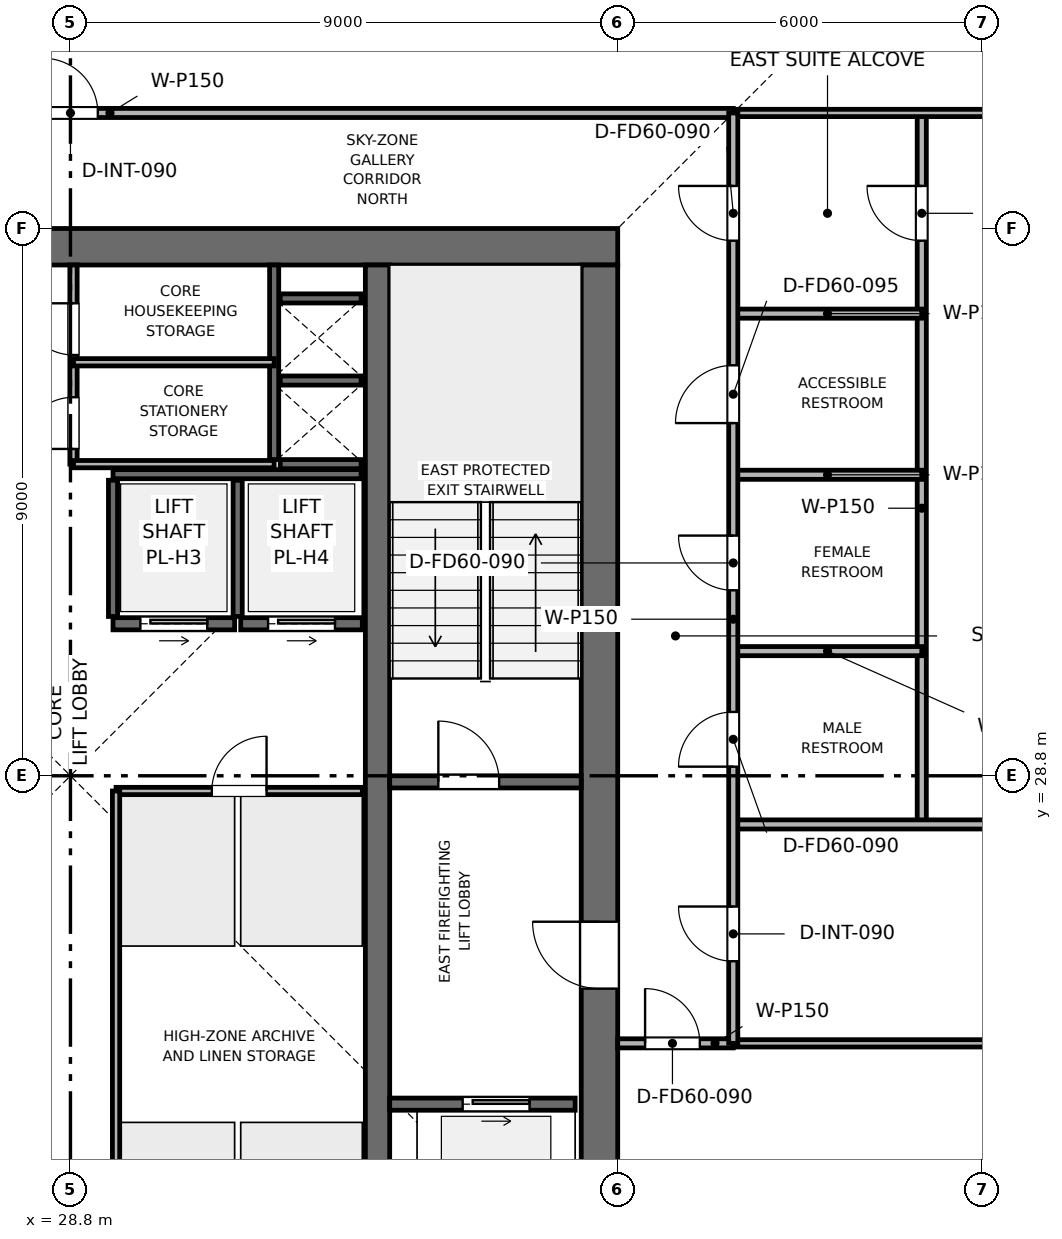
"""IFC4 building model, lengths in metres.
Left out: names, types, materials, properties, quantities, classifications, styles, units other than length and angle.
Written with IfcOpenShell. Run it as: python <this file> out.ifc"""

import sys

from ifc_helpers import new_model, si_unit, direction, frame, frame_2d, origin, place, context, subcontext, project, spatial, rectangle, extrude, element, fill, save


model = new_model("IFC4")
c1 = context("Model", 3, precision=1e-05, world=origin(), true_north=direction((0.0, 1.0)))
c2 = subcontext(c1, "Body", "Model", "MODEL_VIEW")
j1 = project(units=[si_unit("LENGTHUNIT", "METRE"), si_unit("PLANEANGLEUNIT", "RADIAN")], contexts=[c1])
p1 = place(None, origin())
s1 = spatial("IfcSite", under=j1, at=p1, CompositionType="ELEMENT")
p2 = place(p1, origin())
s2 = spatial("IfcBuilding", under=s1, at=p2, CompositionType="ELEMENT")
p3 = place(p2, frame((0.0, 0.0, 295.5)))
s3 = spatial("IfcBuildingStorey", under=s2, at=p3, CompositionType="ELEMENT", Elevation=295.5)
p4 = place(p3, frame((19.8, 37.5, 0.0), z_axis=(0.0, 0.0, 1.0), x_axis=(1.0, 0.0, 0.0)))
e1 = element("IfcWall", 1, at=p4, inside=s3, PredefinedType="SHEAR", context=c2, shape_type="SweptSolid", body=[
    extrude(rectangle(XDim=18.0, YDim=0.6, at=frame_2d((9.0, 0.0))), origin(), (0.0, 0.0, 1.0), 3.75),
])
p5 = place(p4, frame((7.05, 0.0, 0.0)))
e2 = element("IfcOpeningElement", 2, at=p5, cuts=e1, PredefinedType="OPENING", context=c2, shape_type="SweptSolid", body=[
    extrude(rectangle(XDim=1.1, YDim=2.15, at=frame_2d((0.55, 1.075))), frame((0.0, 0.31, 0.0), z_axis=(0.0, -1.0, 0.0), x_axis=(1.0, 0.0, 0.0)), (0.0, 0.0, 1.0), 0.62),
])
p6 = place(p3, frame((37.5, 20.4, 0.0), z_axis=(0.0, 0.0, 1.0), x_axis=(0.0, 1.0, 0.0)))
e3 = element("IfcWall", 3, at=p6, inside=s3, PredefinedType="SHEAR", context=c2, shape_type="SweptSolid", body=[
    extrude(rectangle(XDim=16.8, YDim=0.6, at=frame_2d((8.4, 0.0))), origin(), (0.0, 0.0, 1.0), 3.75),
])
p7 = place(p6, frame((4.9, 0.0, 0.0)))
e4 = element("IfcOpeningElement", 4, at=p7, cuts=e3, PredefinedType="OPENING", context=c2, shape_type="SweptSolid", body=[
    extrude(rectangle(XDim=1.1, YDim=2.15, at=frame_2d((0.55, 1.075))), frame((0.0, 0.31, 0.0), z_axis=(0.0, -1.0, 0.0), x_axis=(1.0, 0.0, 0.0)), (0.0, 0.0, 1.0), 0.62),
])
p8 = place(p3, frame((33.85, 20.4, 0.0), z_axis=(0.0, 0.0, 1.0), x_axis=(0.0, 1.0, 0.0)))
e5 = element("IfcWall", 5, at=p8, inside=s3, PredefinedType="SHEAR", context=c2, shape_type="SweptSolid", body=[
    extrude(rectangle(XDim=16.8, YDim=0.4, at=frame_2d((8.4, 0.0))), origin(), (0.0, 0.0, 1.0), 3.75),
])
p9 = place(p3, frame((34.05, 28.7, 0.0), z_axis=(0.0, 0.0, 1.0), x_axis=(1.0, 0.0, 0.0)))
e6 = element("IfcWall", 6, at=p9, inside=s3, PredefinedType="SHEAR", context=c2, shape_type="SweptSolid", body=[
    extrude(rectangle(XDim=3.15, YDim=0.2, at=frame_2d((1.575, 0.0))), origin(), (0.0, 0.0, 1.0), 3.51),
])
p10 = place(p9, frame((0.8, 0.0, 0.0)))
e7 = element("IfcOpeningElement", 7, at=p10, cuts=e6, PredefinedType="OPENING", context=c2, shape_type="SweptSolid", body=[
    extrude(rectangle(XDim=1.0, YDim=2.1, at=frame_2d((0.5, 1.05))), frame((0.0, 0.11, 0.0), z_axis=(0.0, -1.0, 0.0), x_axis=(1.0, 0.0, 0.0)), (0.0, 0.0, 1.0), 0.22),
])
p11 = place(p3, frame((32.15, 34.0, 0.0), z_axis=(0.0, 0.0, 1.0), x_axis=(0.0, 1.0, 0.0)))
e8 = element("IfcWall", 8, at=p11, inside=s3, PredefinedType="SHEAR", context=c2, shape_type="SweptSolid", body=[
    extrude(rectangle(XDim=3.2, YDim=0.15, at=frame_2d((1.6, 0.0))), origin(), (0.0, 0.0, 1.0), 3.51),
])
for number, where, z_axis, x_axis in (
    (9, (32.25, 33.925, 0.0), (0.0, 0.0, 1.0), (1.0, 0.0, 0.0)),
    (10, (32.25, 35.3, 0.0), (0.0, 0.0, 1.0), (1.0, 0.0, 0.0)),
):
    element("IfcWall", number, at=place(p3, frame(where, z_axis=z_axis, x_axis=x_axis)), inside=s3, PredefinedType="SHEAR", context=c2, shape_type="SweptSolid", body=[
        extrude(rectangle(XDim=1.33, YDim=0.15, at=frame_2d((0.665, 0.0))), origin(), (0.0, 0.0, 1.0), 3.51),
    ])
p12 = place(p3, frame((34.05, 23.4, 0.0), z_axis=(0.0, 0.0, 1.0), x_axis=(1.0, 0.0, 0.0)))
e11 = element("IfcWall", 11, at=p12, inside=s3, PredefinedType="SHEAR", context=c2, shape_type="SweptSolid", body=[
    extrude(rectangle(XDim=3.05, YDim=0.2, at=frame_2d((1.525, 0.0))), origin(), (0.0, 0.0, 1.0), 3.51),
])
p13 = place(p12, frame((1.2, 0.0, 0.0)))
e12 = element("IfcOpeningElement", 12, at=p13, cuts=e11, PredefinedType="OPENING", context=c2, shape_type="SweptSolid", body=[
    extrude(rectangle(XDim=1.1, YDim=2.15, at=frame_2d((0.55, 1.075))), frame((0.0, 0.11, 0.0), z_axis=(0.0, -1.0, 0.0), x_axis=(1.0, 0.0, 0.0)), (0.0, 0.0, 1.0), 0.22),
])
p14 = place(p3, frame((29.5, 31.3, 0.0), z_axis=(0.0, 0.0, 1.0), x_axis=(1.0, 0.0, 0.0)))
e13 = element("IfcWall", 13, at=p14, inside=s3, PredefinedType="SHEAR", context=c2, shape_type="SweptSolid", body=[
    extrude(rectangle(XDim=2.0, YDim=0.2, at=frame_2d((1.0, 0.0))), origin(), (0.0, 0.0, 1.0), 3.51),
])
p15 = place(p14, frame((0.45, 0.0, 0.0)))
e14 = element("IfcOpeningElement", 14, at=p15, cuts=e13, PredefinedType="OPENING", context=c2, shape_type="SweptSolid", body=[
    extrude(rectangle(XDim=1.1, YDim=2.15, at=frame_2d((0.55, 1.075))), frame((0.0, 0.11, 0.0), z_axis=(0.0, -1.0, 0.0), x_axis=(1.0, 0.0, 0.0)), (0.0, 0.0, 1.0), 0.22),
])
p16 = place(p3, frame((31.6, 31.3, 0.0), z_axis=(0.0, 0.0, 1.0), x_axis=(1.0, 0.0, 0.0)))
e15 = element("IfcWall", 15, at=p16, inside=s3, PredefinedType="SHEAR", context=c2, shape_type="SweptSolid", body=[
    extrude(rectangle(XDim=2.0, YDim=0.2, at=frame_2d((1.0, 0.0))), origin(), (0.0, 0.0, 1.0), 3.51),
])
p17 = place(p16, frame((0.45, 0.0, 0.0)))
e16 = element("IfcOpeningElement", 16, at=p17, cuts=e15, PredefinedType="OPENING", context=c2, shape_type="SweptSolid", body=[
    extrude(rectangle(XDim=1.1, YDim=2.15, at=frame_2d((0.55, 1.075))), frame((0.0, 0.11, 0.0), z_axis=(0.0, -1.0, 0.0), x_axis=(1.0, 0.0, 0.0)), (0.0, 0.0, 1.0), 0.22),
])
p18 = place(p3, frame((32.25, 36.65, 0.0), z_axis=(0.0, 0.0, 1.0), x_axis=(1.0, 0.0, 0.0)))
e17 = element("IfcWall", 17, at=p18, inside=s3, PredefinedType="SHEAR", context=c2, shape_type="SweptSolid", body=[
    extrude(rectangle(XDim=1.33, YDim=0.15, at=frame_2d((0.665, 0.0))), origin(), (0.0, 0.0, 1.0), 3.51),
])
p19 = place(p3, frame((29.5, 33.76, 0.0), z_axis=(0.0, 0.0, 1.0), x_axis=(1.0, 0.0, 0.0)))
e18 = element("IfcWall", 18, at=p19, inside=s3, PredefinedType="SHEAR", context=c2, shape_type="SweptSolid", body=[
    extrude(rectangle(XDim=4.08, YDim=0.15, at=frame_2d((2.04, 0.0))), origin(), (0.0, 0.0, 1.0), 3.51),
])
for number, where, z_axis, x_axis in (
    (19, (29.5, 31.42, 0.0), (0.0, 0.0, 1.0), (0.0, 1.0, 0.0)),
    (20, (31.55, 31.42, 0.0), (0.0, 0.0, 1.0), (0.0, 1.0, 0.0)),
):
    element("IfcWall", number, at=place(p3, frame(where, z_axis=z_axis, x_axis=x_axis)), inside=s3, PredefinedType="SHEAR", context=c2, shape_type="SweptSolid", body=[
        extrude(rectangle(XDim=2.24, YDim=0.15, at=frame_2d((1.12, 0.0))), origin(), (0.0, 0.0, 1.0), 3.51),
    ])
p20 = place(p3, frame((28.85, 33.925, 0.0), z_axis=(0.0, 0.0, 1.0), x_axis=(0.0, 1.0, 0.0)))
e21 = element("IfcWall", 21, at=p20, inside=s3, PredefinedType="PARTITIONING", context=c2, shape_type="SweptSolid", body=[
    extrude(rectangle(XDim=3.275, YDim=0.12, at=frame_2d((1.637, 0.0))), origin(), (0.0, 0.0, 1.0), 3.51),
])
p21 = place(p20, frame((0.25, 0.0, 0.0)))
e22 = element("IfcOpeningElement", 22, at=p21, cuts=e21, PredefinedType="OPENING", context=c2, shape_type="SweptSolid", body=[
    extrude(rectangle(XDim=0.85, YDim=2.1, at=frame_2d((0.425, 1.05))), frame((0.0, 0.07, 0.0), z_axis=(0.0, -1.0, 0.0), x_axis=(1.0, 0.0, 0.0)), (0.0, 0.0, 1.0), 0.14),
])
p22 = place(p20, frame((1.795, 0.0, 0.0)))
e23 = element("IfcOpeningElement", 23, at=p22, cuts=e21, PredefinedType="OPENING", context=c2, shape_type="SweptSolid", body=[
    extrude(rectangle(XDim=0.85, YDim=2.1, at=frame_2d((0.425, 1.05))), frame((0.0, 0.07, 0.0), z_axis=(0.0, -1.0, 0.0), x_axis=(1.0, 0.0, 0.0)), (0.0, 0.0, 1.0), 0.14),
])
for number, where, z_axis, x_axis in (
    (24, (28.85, 35.6, 0.0), (0.0, 0.0, 1.0), (1.0, 0.0, 0.0)),
    (25, (28.85, 33.925, 0.0), (0.0, 0.0, 1.0), (1.0, 0.0, 0.0)),
):
    element("IfcWall", number, at=place(p3, frame(where, z_axis=z_axis, x_axis=x_axis)), inside=s3, PredefinedType="PARTITIONING", context=c2, shape_type="SweptSolid", body=[
        extrude(rectangle(XDim=3.3, YDim=0.12, at=frame_2d((1.65, 0.0))), origin(), (0.0, 0.0, 1.0), 3.51),
    ])
p23 = place(p3, frame((29.55, 28.55, 0.0), z_axis=(0.0, 0.0, 1.0), x_axis=(1.0, 0.0, 0.0)))
e26 = element("IfcWall", 26, at=p23, inside=s3, PredefinedType="PARTITIONING", context=c2, shape_type="SweptSolid", body=[
    extrude(rectangle(XDim=4.05, YDim=0.12, at=frame_2d((2.025, 0.0))), origin(), (0.0, 0.0, 1.0), 3.51),
])
p24 = place(p23, frame((1.575, 0.0, 0.0)))
e27 = element("IfcOpeningElement", 27, at=p24, cuts=e26, PredefinedType="OPENING", context=c2, shape_type="SweptSolid", body=[
    extrude(rectangle(XDim=0.9, YDim=2.1, at=frame_2d((0.45, 1.05))), frame((0.0, 0.07, 0.0), z_axis=(0.0, -1.0, 0.0), x_axis=(1.0, 0.0, 0.0)), (0.0, 0.0, 1.0), 0.14),
])
p25 = place(p3, frame((29.55, 20.4, 0.0), z_axis=(0.0, 0.0, 1.0), x_axis=(0.0, 1.0, 0.0)))
e28 = element("IfcWall", 28, at=p25, inside=s3, PredefinedType="PARTITIONING", context=c2, shape_type="SweptSolid", body=[
    extrude(rectangle(XDim=8.15, YDim=0.12, at=frame_2d((4.075, 0.0))), origin(), (0.0, 0.0, 1.0), 3.51),
])
p26 = place(p3, frame((37.8, 24.4, 0.0), z_axis=(0.0, 0.0, 1.0), x_axis=(1.0, 0.0, 0.0)))
e29 = element("IfcWall", 29, at=p26, inside=s3, PredefinedType="PARTITIONING", context=c2, shape_type="SweptSolid", body=[
    extrude(rectangle(XDim=1.9, YDim=0.15, at=frame_2d((0.95, 0.0))), origin(), (0.0, 0.0, 1.0), 3.51),
])
p27 = place(p26, frame((0.45, 0.0, 0.0)))
e30 = element("IfcOpeningElement", 30, at=p27, cuts=e29, PredefinedType="OPENING", context=c2, shape_type="SweptSolid", body=[
    extrude(rectangle(XDim=0.9, YDim=2.1, at=frame_2d((0.45, 1.05))), frame((0.0, 0.085, 0.0), z_axis=(0.0, -1.0, 0.0), x_axis=(1.0, 0.0, 0.0)), (0.0, 0.0, 1.0), 0.17),
])
p28 = place(p3, frame((39.7, 24.4, 0.0), z_axis=(0.0, 0.0, 1.0), x_axis=(1.0, 0.0, 0.0)))
e31 = element("IfcWall", 31, at=p28, inside=s3, PredefinedType="PARTITIONING", context=c2, shape_type="SweptSolid", body=[
    extrude(rectangle(XDim=11.77, YDim=0.12, at=frame_2d((5.885, 0.0))), origin(), (0.0, 0.0, 1.0), 3.135),
])
p29 = place(p3, frame((42.8, 28.0, 0.0), z_axis=(0.0, 0.0, 1.0), x_axis=(0.0, 1.0, 0.0)))
e32 = element("IfcWall", 32, at=p29, inside=s3, PredefinedType="PARTITIONING", context=c2, shape_type="SweptSolid", body=[
    extrude(rectangle(XDim=11.7, YDim=0.15, at=frame_2d((5.85, 0.0))), origin(), (0.0, 0.0, 1.0), 3.095),
])
p30 = place(p29, frame((9.6, 0.0, 0.0)))
e33 = element("IfcOpeningElement", 33, at=p30, cuts=e32, PredefinedType="OPENING", context=c2, shape_type="SweptSolid", body=[
    extrude(rectangle(XDim=0.9, YDim=2.1, at=frame_2d((0.45, 1.05))), frame((0.0, 0.085, 0.0), z_axis=(0.0, -1.0, 0.0), x_axis=(1.0, 0.0, 0.0)), (0.0, 0.0, 1.0), 0.17),
])
p31 = place(p3, frame((39.7, 28.0, 0.0), z_axis=(0.0, 0.0, 1.0), x_axis=(1.0, 0.0, 0.0)))
e34 = element("IfcWall", 34, at=p31, inside=s3, PredefinedType="PARTITIONING", context=c2, shape_type="SweptSolid", body=[
    extrude(rectangle(XDim=11.77, YDim=0.15, at=frame_2d((5.885, 0.0))), origin(), (0.0, 0.0, 1.0), 3.135),
])
for number, where, z_axis, x_axis in (
    (35, (39.7, 36.4, 0.0), (0.0, 0.0, 1.0), (1.0, 0.0, 0.0)),
    (36, (39.7, 30.85, 0.0), (0.0, 0.0, 1.0), (1.0, 0.0, 0.0)),
    (37, (39.7, 33.75, 0.0), (0.0, 0.0, 1.0), (1.0, 0.0, 0.0)),
):
    element("IfcWall", number, at=place(p3, frame(where, z_axis=z_axis, x_axis=x_axis)), inside=s3, PredefinedType="PARTITIONING", context=c2, shape_type="SweptSolid", body=[
        extrude(rectangle(XDim=3.1, YDim=0.15, at=frame_2d((1.55, 0.0))), origin(), (0.0, 0.0, 1.0), 3.135),
    ])
p32 = place(p3, frame((39.7, 39.7, 0.0), z_axis=(0.0, 0.0, 1.0), x_axis=(1.0, 0.0, 0.0)))
e38 = element("IfcWall", 38, at=p32, inside=s3, PredefinedType="PARTITIONING", context=c2, shape_type="SweptSolid", body=[
    extrude(rectangle(XDim=11.77, YDim=0.12, at=frame_2d((5.885, 0.0))), origin(), (0.0, 0.0, 1.0), 3.095),
])
p33 = place(p3, frame((17.9, 39.7, 0.0), z_axis=(0.0, 0.0, 1.0), x_axis=(1.0, 0.0, 0.0)))
e39 = element("IfcWall", 39, at=p33, inside=s3, PredefinedType="PARTITIONING", context=c2, shape_type="SweptSolid", body=[
    extrude(rectangle(XDim=21.8, YDim=0.15, at=frame_2d((10.9, 0.0))), origin(), (0.0, 0.0, 1.0), 3.095),
])
p34 = place(p33, frame((10.45, 0.0, 0.0)))
e40 = element("IfcOpeningElement", 40, at=p34, cuts=e39, PredefinedType="OPENING", context=c2, shape_type="SweptSolid", body=[
    extrude(rectangle(XDim=0.9, YDim=2.1, at=frame_2d((0.45, 1.05))), frame((0.0, 0.085, 0.0), z_axis=(0.0, -1.0, 0.0), x_axis=(1.0, 0.0, 0.0)), (0.0, 0.0, 1.0), 0.17),
])
p35 = place(p3, frame((39.7, 24.4, 0.0), z_axis=(0.0, 0.0, 1.0), x_axis=(0.0, 1.0, 0.0)))
e41 = element("IfcWall", 41, at=p35, inside=s3, PredefinedType="PARTITIONING", context=c2, shape_type="SweptSolid", body=[
    extrude(rectangle(XDim=15.3, YDim=0.15, at=frame_2d((7.65, 0.0))), origin(), (0.0, 0.0, 1.0), 3.095),
])
p36 = place(p35, frame((1.35, 0.0, 0.0)))
e42 = element("IfcOpeningElement", 42, at=p36, cuts=e41, PredefinedType="OPENING", context=c2, shape_type="SweptSolid", body=[
    extrude(rectangle(XDim=0.9, YDim=2.1, at=frame_2d((0.45, 1.05))), frame((0.0, 0.085, 0.0), z_axis=(0.0, -1.0, 0.0), x_axis=(1.0, 0.0, 0.0)), (0.0, 0.0, 1.0), 0.17),
])
p37 = place(p35, frame((4.55, 0.0, 0.0)))
e43 = element("IfcOpeningElement", 43, at=p37, cuts=e41, PredefinedType="OPENING", context=c2, shape_type="SweptSolid", body=[
    extrude(rectangle(XDim=0.9, YDim=2.1, at=frame_2d((0.45, 1.05))), frame((0.0, 0.085, 0.0), z_axis=(0.0, -1.0, 0.0), x_axis=(1.0, 0.0, 0.0)), (0.0, 0.0, 1.0), 0.17),
])
p38 = place(p35, frame((7.45, 0.0, 0.0)))
e44 = element("IfcOpeningElement", 44, at=p38, cuts=e41, PredefinedType="OPENING", context=c2, shape_type="SweptSolid", body=[
    extrude(rectangle(XDim=0.9, YDim=2.1, at=frame_2d((0.45, 1.05))), frame((0.0, 0.085, 0.0), z_axis=(0.0, -1.0, 0.0), x_axis=(1.0, 0.0, 0.0)), (0.0, 0.0, 1.0), 0.17),
])
p39 = place(p35, frame((10.2, 0.0, 0.0)))
e45 = element("IfcOpeningElement", 45, at=p39, cuts=e41, PredefinedType="OPENING", context=c2, shape_type="SweptSolid", body=[
    extrude(rectangle(XDim=0.95, YDim=2.1, at=frame_2d((0.475, 1.05))), frame((0.0, 0.085, 0.0), z_axis=(0.0, -1.0, 0.0), x_axis=(1.0, 0.0, 0.0)), (0.0, 0.0, 1.0), 0.17),
])
p40 = place(p35, frame((13.2, 0.0, 0.0)))
e46 = element("IfcOpeningElement", 46, at=p40, cuts=e41, PredefinedType="OPENING", context=c2, shape_type="SweptSolid", body=[
    extrude(rectangle(XDim=0.9, YDim=2.1, at=frame_2d((0.45, 1.05))), frame((0.0, 0.085, 0.0), z_axis=(0.0, -1.0, 0.0), x_axis=(1.0, 0.0, 0.0)), (0.0, 0.0, 1.0), 0.17),
])
p41 = place(p10, origin())
e47 = element("IfcDoor", 47, at=p41, inside=s3, OperationType="SINGLE_SWING_LEFT", PredefinedType="DOOR", context=c2, shape_type="SweptSolid", body=[
    extrude(rectangle(XDim=1.0, YDim=2.1, at=frame_2d((0.5, 1.05))), frame((0.0, 0.025, 0.0), z_axis=(0.0, -1.0, 0.0), x_axis=(1.0, 0.0, 0.0)), (0.0, 0.0, 1.0), 0.05),
])
fill(e7, e47)
p42 = place(p13, origin())
e48 = element("IfcDoor", 48, at=p42, inside=s3, OperationType="SLIDING_TO_RIGHT", PredefinedType="DOOR", context=c2, shape_type="SweptSolid", body=[
    extrude(rectangle(XDim=1.1, YDim=2.15, at=frame_2d((0.55, 1.075))), frame((0.0, 0.025, 0.0), z_axis=(0.0, -1.0, 0.0), x_axis=(1.0, 0.0, 0.0)), (0.0, 0.0, 1.0), 0.05),
])
fill(e12, e48)
p43 = place(p15, origin())
e49 = element("IfcDoor", 49, at=p43, inside=s3, OperationType="SLIDING_TO_RIGHT", PredefinedType="DOOR", context=c2, shape_type="SweptSolid", body=[
    extrude(rectangle(XDim=1.1, YDim=2.15, at=frame_2d((0.55, 1.075))), frame((0.0, 0.025, 0.0), z_axis=(0.0, -1.0, 0.0), x_axis=(1.0, 0.0, 0.0)), (0.0, 0.0, 1.0), 0.05),
])
fill(e14, e49)
p44 = place(p17, origin())
e50 = element("IfcDoor", 50, at=p44, inside=s3, OperationType="SLIDING_TO_RIGHT", PredefinedType="DOOR", context=c2, shape_type="SweptSolid", body=[
    extrude(rectangle(XDim=1.1, YDim=2.15, at=frame_2d((0.55, 1.075))), frame((0.0, 0.025, 0.0), z_axis=(0.0, -1.0, 0.0), x_axis=(1.0, 0.0, 0.0)), (0.0, 0.0, 1.0), 0.05),
])
fill(e16, e50)
p45 = place(p21, origin())
e51 = element("IfcDoor", 51, at=p45, inside=s3, OperationType="SINGLE_SWING_LEFT", PredefinedType="DOOR", context=c2, shape_type="SweptSolid", body=[
    extrude(rectangle(XDim=0.85, YDim=2.1, at=frame_2d((0.425, 1.05))), frame((0.0, 0.025, 0.0), z_axis=(0.0, -1.0, 0.0), x_axis=(1.0, 0.0, 0.0)), (0.0, 0.0, 1.0), 0.05),
])
fill(e22, e51)
p46 = place(p22, origin())
e52 = element("IfcDoor", 52, at=p46, inside=s3, OperationType="SINGLE_SWING_RIGHT", PredefinedType="DOOR", context=c2, shape_type="SweptSolid", body=[
    extrude(rectangle(XDim=0.85, YDim=2.1, at=frame_2d((0.425, 1.05))), frame((0.0, 0.025, 0.0), z_axis=(0.0, -1.0, 0.0), x_axis=(1.0, 0.0, 0.0)), (0.0, 0.0, 1.0), 0.05),
])
fill(e23, e52)
p47 = place(p24, origin())
e53 = element("IfcDoor", 53, at=p47, inside=s3, OperationType="SINGLE_SWING_RIGHT", PredefinedType="DOOR", context=c2, shape_type="SweptSolid", body=[
    extrude(rectangle(XDim=0.9, YDim=2.1, at=frame_2d((0.45, 1.05))), frame((0.0, 0.025, 0.0), z_axis=(0.0, -1.0, 0.0), x_axis=(1.0, 0.0, 0.0)), (0.0, 0.0, 1.0), 0.05),
])
fill(e27, e53)
p48 = place(p27, origin())
e54 = element("IfcDoor", 54, at=p48, inside=s3, OperationType="SINGLE_SWING_LEFT", PredefinedType="DOOR", context=c2, shape_type="SweptSolid", body=[
    extrude(rectangle(XDim=0.9, YDim=2.1, at=frame_2d((0.45, 1.05))), frame((0.0, 0.025, 0.0), z_axis=(0.0, -1.0, 0.0), x_axis=(1.0, 0.0, 0.0)), (0.0, 0.0, 1.0), 0.05),
])
fill(e30, e54)
p49 = place(p30, origin())
e55 = element("IfcDoor", 55, at=p49, inside=s3, OperationType="SINGLE_SWING_RIGHT", PredefinedType="DOOR", context=c2, shape_type="SweptSolid", body=[
    extrude(rectangle(XDim=0.9, YDim=2.1, at=frame_2d((0.45, 1.05))), frame((0.0, 0.025, 0.0), z_axis=(0.0, -1.0, 0.0), x_axis=(1.0, 0.0, 0.0)), (0.0, 0.0, 1.0), 0.05),
])
fill(e33, e55)
p50 = place(p34, origin())
e56 = element("IfcDoor", 56, at=p50, inside=s3, OperationType="SINGLE_SWING_LEFT", PredefinedType="DOOR", context=c2, shape_type="SweptSolid", body=[
    extrude(rectangle(XDim=0.9, YDim=2.1, at=frame_2d((0.45, 1.05))), frame((0.0, 0.025, 0.0), z_axis=(0.0, -1.0, 0.0), x_axis=(1.0, 0.0, 0.0)), (0.0, 0.0, 1.0), 0.05),
])
fill(e40, e56)
p51 = place(p36, origin())
e57 = element("IfcDoor", 57, at=p51, inside=s3, OperationType="SINGLE_SWING_RIGHT", PredefinedType="DOOR", context=c2, shape_type="SweptSolid", body=[
    extrude(rectangle(XDim=0.9, YDim=2.1, at=frame_2d((0.45, 1.05))), frame((0.0, 0.025, 0.0), z_axis=(0.0, -1.0, 0.0), x_axis=(1.0, 0.0, 0.0)), (0.0, 0.0, 1.0), 0.05),
])
fill(e42, e57)
p52 = place(p37, origin())
e58 = element("IfcDoor", 58, at=p52, inside=s3, OperationType="SINGLE_SWING_LEFT", PredefinedType="DOOR", context=c2, shape_type="SweptSolid", body=[
    extrude(rectangle(XDim=0.9, YDim=2.1, at=frame_2d((0.45, 1.05))), frame((0.0, 0.025, 0.0), z_axis=(0.0, -1.0, 0.0), x_axis=(1.0, 0.0, 0.0)), (0.0, 0.0, 1.0), 0.05),
])
fill(e43, e58)
p53 = place(p38, origin())
e59 = element("IfcDoor", 59, at=p53, inside=s3, OperationType="SINGLE_SWING_RIGHT", PredefinedType="DOOR", context=c2, shape_type="SweptSolid", body=[
    extrude(rectangle(XDim=0.9, YDim=2.1, at=frame_2d((0.45, 1.05))), frame((0.0, 0.025, 0.0), z_axis=(0.0, -1.0, 0.0), x_axis=(1.0, 0.0, 0.0)), (0.0, 0.0, 1.0), 0.05),
])
fill(e44, e59)
p54 = place(p39, origin())
e60 = element("IfcDoor", 60, at=p54, inside=s3, OperationType="SINGLE_SWING_LEFT", PredefinedType="DOOR", context=c2, shape_type="SweptSolid", body=[
    extrude(rectangle(XDim=0.95, YDim=2.1, at=frame_2d((0.475, 1.05))), frame((0.0, 0.025, 0.0), z_axis=(0.0, -1.0, 0.0), x_axis=(1.0, 0.0, 0.0)), (0.0, 0.0, 1.0), 0.05),
])
fill(e45, e60)
p55 = place(p40, origin())
e61 = element("IfcDoor", 61, at=p55, inside=s3, OperationType="SINGLE_SWING_RIGHT", PredefinedType="DOOR", context=c2, shape_type="SweptSolid", body=[
    extrude(rectangle(XDim=0.9, YDim=2.1, at=frame_2d((0.45, 1.05))), frame((0.0, 0.025, 0.0), z_axis=(0.0, -1.0, 0.0), x_axis=(1.0, 0.0, 0.0)), (0.0, 0.0, 1.0), 0.05),
])
fill(e46, e61)
p56 = place(p7, origin())
e62 = element("IfcDoor", 62, at=p56, inside=s3, OperationType="SINGLE_SWING_RIGHT", PredefinedType="DOOR", context=c2, shape_type="SweptSolid", body=[
    extrude(rectangle(XDim=1.1, YDim=2.15, at=frame_2d((0.55, 1.075))), frame((0.0, 0.025, 0.0), z_axis=(0.0, -1.0, 0.0), x_axis=(1.0, 0.0, 0.0)), (0.0, 0.0, 1.0), 0.05),
])
fill(e4, e62)
save(model, sys.argv[1])
